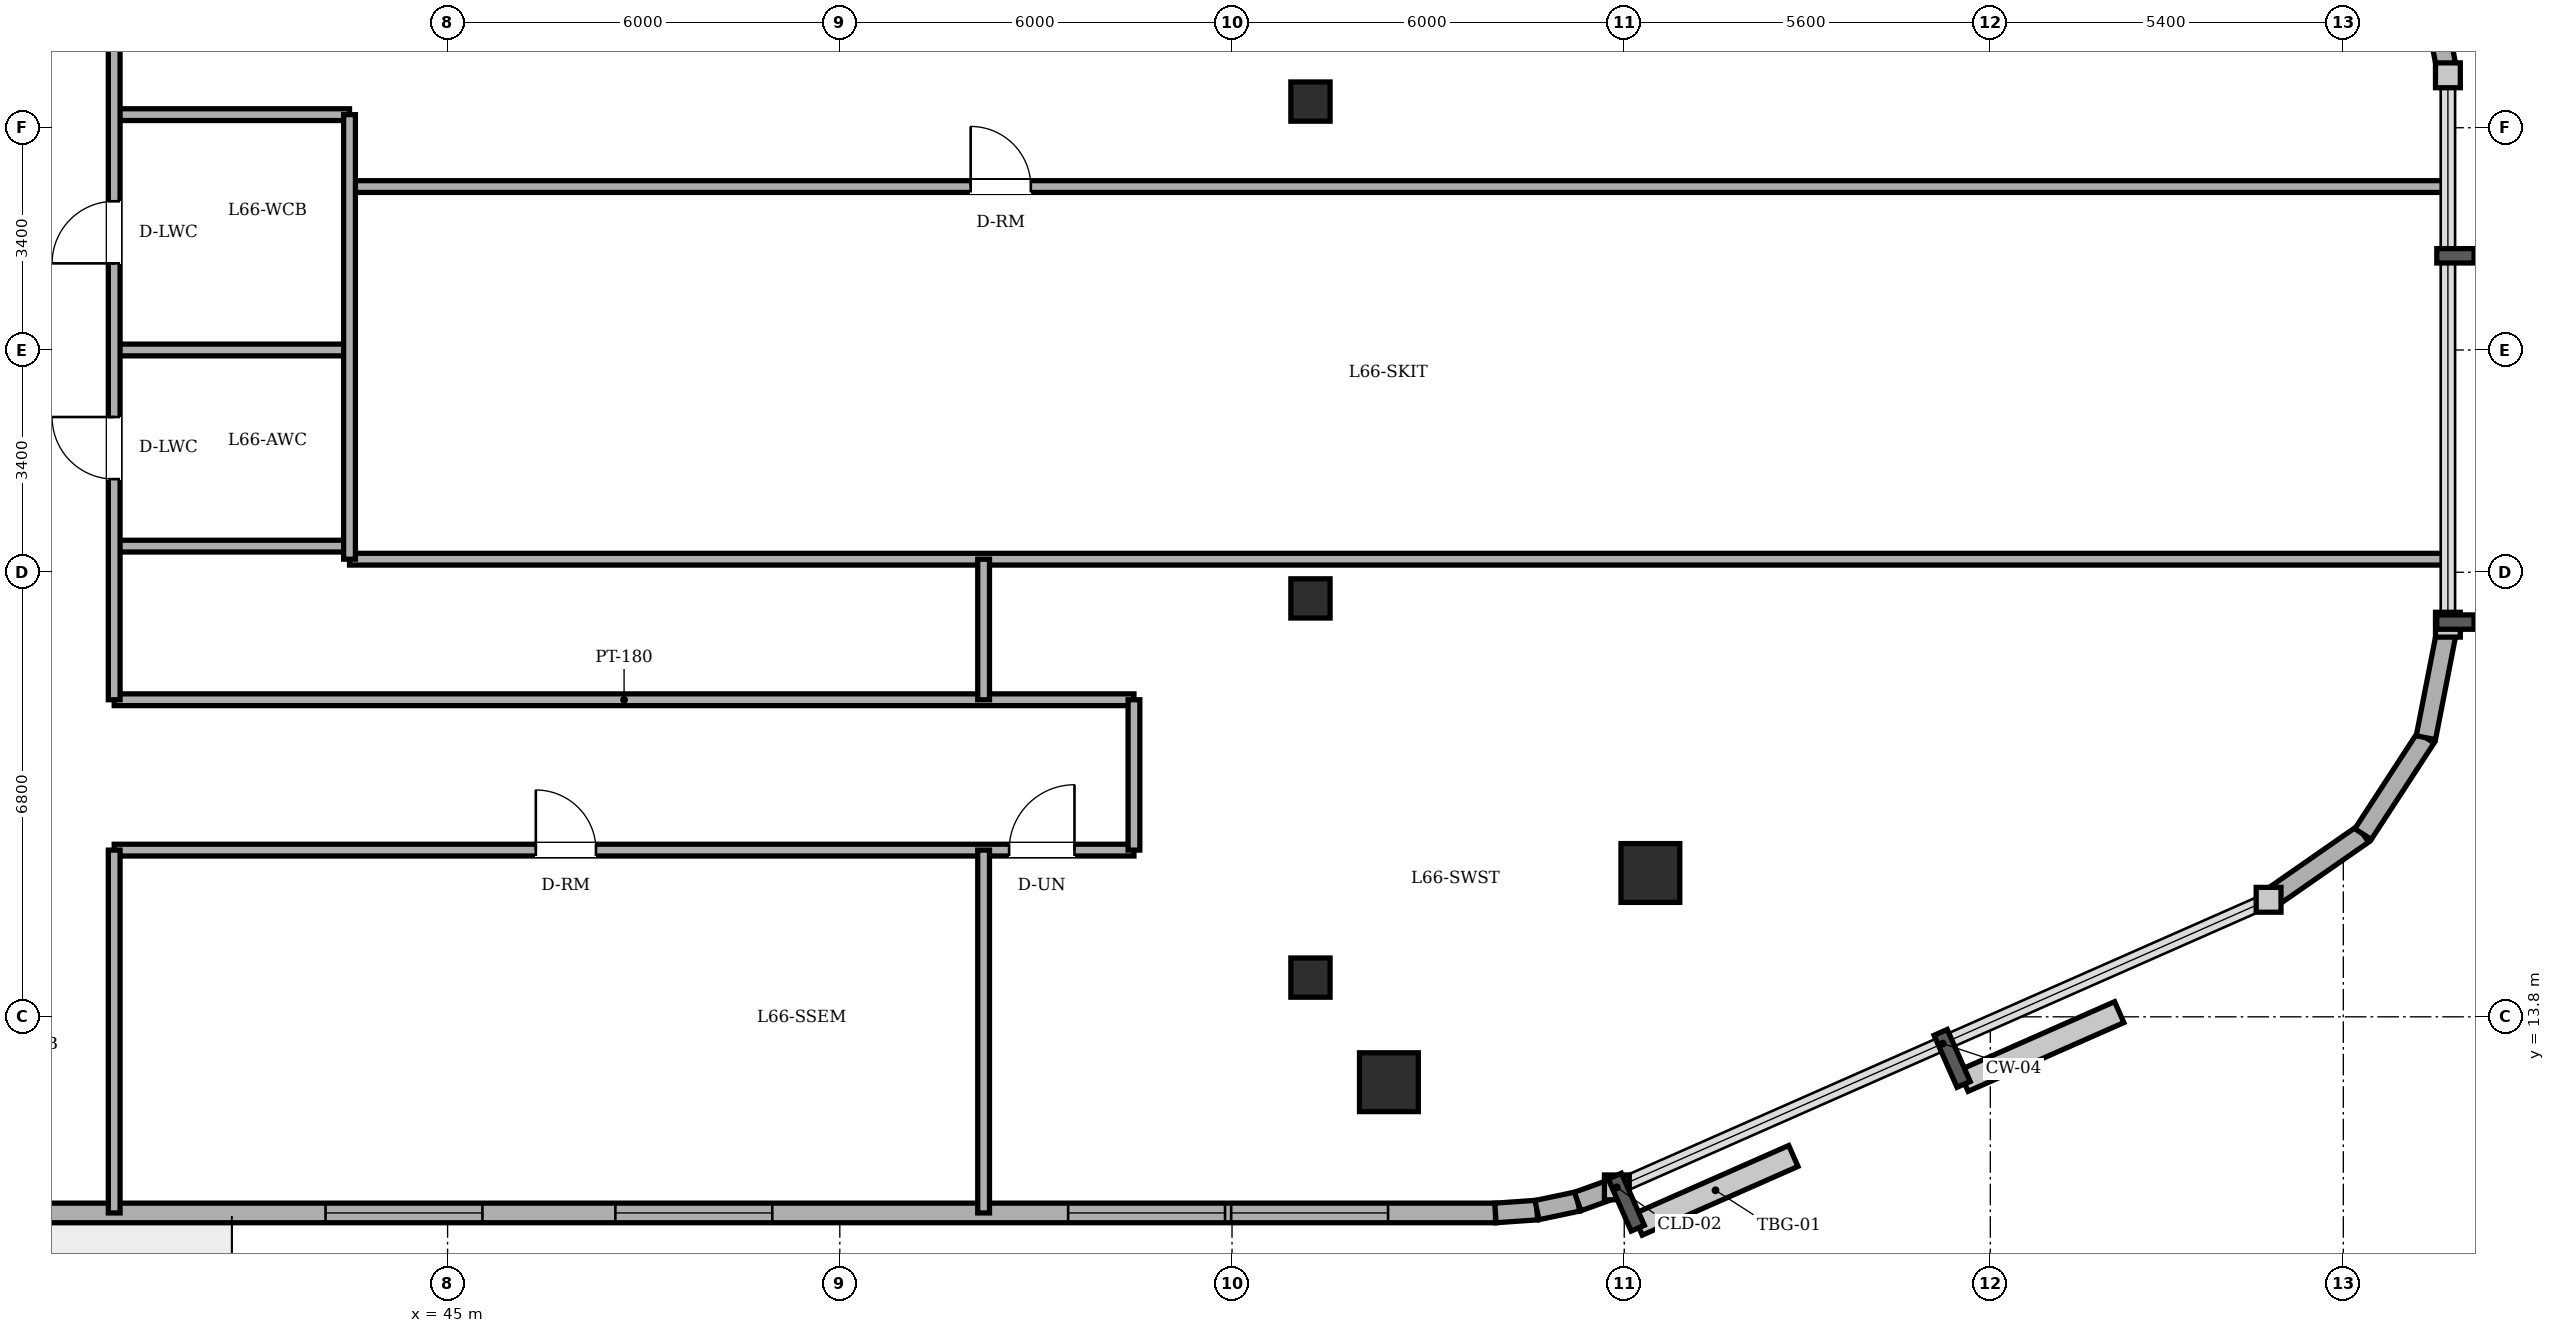
"""IFC4 building model, lengths in metres.
Left out: names, types, materials, properties, quantities, classifications, styles, units other than length and angle.
Written with IfcOpenShell. Run it as: python <this file> out.ifc"""

import sys

from ifc_helpers import new_model, si_unit, direction, frame, frame_2d, origin, origin_2d, place, context, subcontext, project, spatial, rectangle, circle, extrude, element, fill, save


model = new_model("IFC4")
c1 = context("Model", 3, precision=1e-05, world=origin(), true_north=direction((0.0, 1.0)))
c2 = subcontext(c1, "Body", "Model", "MODEL_VIEW")
j1 = project(units=[si_unit("LENGTHUNIT", "METRE"), si_unit("PLANEANGLEUNIT", "RADIAN")], contexts=[c1])
p1 = place(None, origin())
s1 = spatial("IfcSite", under=j1, at=p1, CompositionType="ELEMENT")
p2 = place(p1, origin())
s2 = spatial("IfcBuilding", under=s1, at=p2, CompositionType="ELEMENT")
p3 = place(p2, frame((0.0, 0.0, 253.7)))
s3 = spatial("IfcBuildingStorey", under=s2, at=p3, CompositionType="ELEMENT", Elevation=253.7)
for number, where, z_axis, x_axis in (
    (1, (59.4, 12.8, 0.0), (0.0, 0.0, 1.0), (1.0, 0.0, 0.0)),
    (2, (63.4, 16.0, 0.0), (0.0, 0.0, 1.0), (1.0, 0.0, 0.0)),
):
    element("IfcColumn", number, at=place(p3, frame(where, z_axis=z_axis, x_axis=x_axis)), inside=s3, PredefinedType="COLUMN", context=c2, shape_type="SweptSolid", body=[
        extrude(circle(Radius=0.45, at=origin_2d()), origin(), (0.0, 0.0, 1.0), 5.1),
    ])
for number, where, z_axis, x_axis in (
    (3, (58.2, 14.4, 0.0), (0.0, 0.0, 1.0), (1.0, 0.0, 0.0)),
    (4, (58.2, 20.2, 0.0), (0.0, 0.0, 1.0), (1.0, 0.0, 0.0)),
    (5, (58.2, 27.8, 0.0), (0.0, 0.0, 1.0), (1.0, 0.0, 0.0)),
):
    element("IfcColumn", number, at=place(p3, frame(where, z_axis=z_axis, x_axis=x_axis)), inside=s3, PredefinedType="COLUMN", context=c2, shape_type="SweptSolid", body=[
        extrude(rectangle(XDim=0.6, YDim=0.6, at=origin_2d()), origin(), (0.0, 0.0, 1.0), 5.1),
    ])
p4 = place(p3, frame((24.0, 10.8, 0.0), z_axis=(0.0, 0.0, 1.0), x_axis=(1.0, 0.0, 0.0)))
e6 = element("IfcWall", 6, at=p4, inside=s3, PredefinedType="SOLIDWALL", context=c2, shape_type="SweptSolid", body=[
    extrude(rectangle(XDim=37.03, YDim=0.3, at=frame_2d((18.515, 0.0))), origin(), (0.0, 0.0, 1.0), 4.9),
])
p5 = place(p4, frame((11.225, 0.0, 0.0)))
e7 = element("IfcOpeningElement", 7, at=p5, cuts=e6, PredefinedType="OPENING", context=c2, shape_type="SweptSolid", body=[
    extrude(rectangle(XDim=0.95, YDim=2.2, at=frame_2d((0.475, 1.1))), frame((0.0, 0.16, 0.0), z_axis=(0.0, -1.0, 0.0), x_axis=(1.0, 0.0, 0.0)), (0.0, 0.0, 1.0), 0.32),
])
p6 = place(p4, frame((4.333, 0.0, 0.85)))
e8 = element("IfcOpeningElement", 8, at=p6, cuts=e6, PredefinedType="OPENING", context=c2, shape_type="SweptSolid", body=[
    extrude(rectangle(XDim=2.4, YDim=2.1, at=frame_2d((1.2, 1.05))), frame((0.0, 0.16, 0.0), z_axis=(0.0, -1.0, 0.0), x_axis=(1.0, 0.0, 0.0)), (0.0, 0.0, 1.0), 0.32),
])
p7 = place(p4, frame((19.133, 0.0, 0.85)))
e9 = element("IfcOpeningElement", 9, at=p7, cuts=e6, PredefinedType="OPENING", context=c2, shape_type="SweptSolid", body=[
    extrude(rectangle(XDim=2.4, YDim=2.1, at=frame_2d((1.2, 1.05))), frame((0.0, 0.16, 0.0), z_axis=(0.0, -1.0, 0.0), x_axis=(1.0, 0.0, 0.0)), (0.0, 0.0, 1.0), 0.32),
])
p8 = place(p4, frame((23.567, 0.0, 0.85)))
e10 = element("IfcOpeningElement", 10, at=p8, cuts=e6, PredefinedType="OPENING", context=c2, shape_type="SweptSolid", body=[
    extrude(rectangle(XDim=2.4, YDim=2.1, at=frame_2d((1.2, 1.05))), frame((0.0, 0.16, 0.0), z_axis=(0.0, -1.0, 0.0), x_axis=(1.0, 0.0, 0.0)), (0.0, 0.0, 1.0), 0.32),
])
p9 = place(p4, frame((30.493, 0.0, 0.85)))
e11 = element("IfcOpeningElement", 11, at=p9, cuts=e6, PredefinedType="OPENING", context=c2, shape_type="SweptSolid", body=[
    extrude(rectangle(XDim=2.4, YDim=2.1, at=frame_2d((1.2, 1.05))), frame((0.0, 0.16, 0.0), z_axis=(0.0, -1.0, 0.0), x_axis=(1.0, 0.0, 0.0)), (0.0, 0.0, 1.0), 0.32),
])
p10 = place(p4, frame((32.987, 0.0, 0.85)))
e12 = element("IfcOpeningElement", 12, at=p10, cuts=e6, PredefinedType="OPENING", context=c2, shape_type="SweptSolid", body=[
    extrude(rectangle(XDim=2.4, YDim=2.1, at=frame_2d((1.2, 1.05))), frame((0.0, 0.16, 0.0), z_axis=(0.0, -1.0, 0.0), x_axis=(1.0, 0.0, 0.0)), (0.0, 0.0, 1.0), 0.32),
])
p11 = place(p3, frame((61.03, 10.8, 0.0), z_axis=(0.0, 0.0, 1.0), x_axis=(0.997613959688, 0.069039028352, 0.0)))
e13 = element("IfcWall", 13, at=p11, inside=s3, PredefinedType="SOLIDWALL", context=c2, shape_type="SweptSolid", body=[
    extrude(rectangle(XDim=0.636, YDim=0.3, at=frame_2d((0.318, 0.0))), origin(), (0.0, 0.0, 1.0), 4.9),
])
p12 = place(p3, frame((61.665, 10.844, 0.0), z_axis=(0.0, 0.0, 1.0), x_axis=(0.97857012251, 0.205913854149, 0.0)))
e14 = element("IfcWall", 14, at=p12, inside=s3, PredefinedType="SOLIDWALL", context=c2, shape_type="SweptSolid", body=[
    extrude(rectangle(XDim=0.637, YDim=0.3, at=frame_2d((0.318, 0.0))), origin(), (0.0, 0.0, 1.0), 4.9),
])
p13 = place(p3, frame((62.288, 10.975, 0.0), z_axis=(0.0, 0.0, 1.0), x_axis=(0.94077491148, 0.339031806665, 0.0)))
e15 = element("IfcWall", 15, at=p13, inside=s3, PredefinedType="SOLIDWALL", context=c2, shape_type="SweptSolid", body=[
    extrude(rectangle(XDim=0.636, YDim=0.3, at=frame_2d((0.318, 0.0))), origin(), (0.0, 0.0, 1.0), 4.9),
])
p14 = place(p3, frame((72.857, 15.59, 0.0), z_axis=(0.0, 0.0, 1.0), x_axis=(0.821006966142, 0.570918174124, 0.0)))
e16 = element("IfcWall", 16, at=p14, inside=s3, PredefinedType="SOLIDWALL", context=c2, shape_type="SweptSolid", body=[
    extrude(rectangle(XDim=1.76, YDim=0.3, at=frame_2d((0.88, 0.0))), origin(), (0.0, 0.0, 1.0), 4.9),
])
for number, where, z_axis, x_axis in (
    (17, (74.302, 16.595, 0.0), (0.0, 0.0, 1.0), (0.546, 0.838, 0.0)),
    (18, (75.263, 18.07, 0.0), (0.0, 0.0, 1.0), (0.192, 0.981, 0.0)),
    (19, (75.6, 28.202, 0.0), (0.0, 0.0, 1.0), (-0.192, 0.981, 0.0)),
):
    element("IfcWall", number, at=place(p3, frame(where, z_axis=z_axis, x_axis=x_axis)), inside=s3, PredefinedType="SOLIDWALL", context=c2, shape_type="SweptSolid", body=[
        extrude(rectangle(XDim=1.76, YDim=0.3, at=frame_2d((0.88, 0.0))), origin(), (0.0, 0.0, 1.0), 4.9),
    ])
p15 = place(p3, frame((39.9, 16.35, 0.0), z_axis=(0.0, 0.0, 1.0), x_axis=(1.0, 0.0, 0.0)))
e20 = element("IfcWall", 20, at=p15, inside=s3, PredefinedType="PARTITIONING", context=c2, shape_type="SweptSolid", body=[
    extrude(rectangle(XDim=15.6, YDim=0.18, at=frame_2d((7.8, 0.0))), origin(), (0.0, 0.0, 1.0), 4.522),
])
p16 = place(p15, frame((6.45, 0.0, 0.0)))
e21 = element("IfcOpeningElement", 21, at=p16, cuts=e20, PredefinedType="OPENING", context=c2, shape_type="SweptSolid", body=[
    extrude(rectangle(XDim=0.92, YDim=2.1, at=frame_2d((0.46, 1.05))), frame((0.0, 0.1, 0.0), z_axis=(0.0, -1.0, 0.0), x_axis=(1.0, 0.0, 0.0)), (0.0, 0.0, 1.0), 0.2),
])
p17 = place(p15, frame((13.69, 0.0, 0.0)))
e22 = element("IfcOpeningElement", 22, at=p17, cuts=e20, PredefinedType="OPENING", context=c2, shape_type="SweptSolid", body=[
    extrude(rectangle(XDim=1.0, YDim=2.15, at=frame_2d((0.5, 1.075))), frame((0.0, 0.1, 0.0), z_axis=(0.0, -1.0, 0.0), x_axis=(1.0, 0.0, 0.0)), (0.0, 0.0, 1.0), 0.2),
])
p18 = place(p3, frame((39.9, 18.65, 0.0), z_axis=(0.0, 0.0, 1.0), x_axis=(1.0, 0.0, 0.0)))
e23 = element("IfcWall", 23, at=p18, inside=s3, PredefinedType="PARTITIONING", context=c2, shape_type="SweptSolid", body=[
    extrude(rectangle(XDim=15.6, YDim=0.18, at=frame_2d((7.8, 0.0))), origin(), (0.0, 0.0, 1.0), 4.9),
])
p19 = place(p3, frame((43.5, 20.8, 0.0), z_axis=(0.0, 0.0, 1.0), x_axis=(1.0, 0.0, 0.0)))
e24 = element("IfcWall", 24, at=p19, inside=s3, PredefinedType="PARTITIONING", context=c2, shape_type="SweptSolid", body=[
    extrude(rectangle(XDim=32.1, YDim=0.18, at=frame_2d((16.05, 0.0))), origin(), (0.0, 0.0, 1.0), 4.9),
])
p20 = place(p3, frame((39.9, 21.0, 0.0), z_axis=(0.0, 0.0, 1.0), x_axis=(1.0, 0.0, 0.0)))
e25 = element("IfcWall", 25, at=p20, inside=s3, PredefinedType="PARTITIONING", context=c2, shape_type="SweptSolid", body=[
    extrude(rectangle(XDim=3.6, YDim=0.18, at=frame_2d((1.8, 0.0))), origin(), (0.0, 0.0, 1.0), 4.9),
])
p21 = place(p3, frame((39.9, 24.0, 0.0), z_axis=(0.0, 0.0, 1.0), x_axis=(1.0, 0.0, 0.0)))
e26 = element("IfcWall", 26, at=p21, inside=s3, PredefinedType="PARTITIONING", context=c2, shape_type="SweptSolid", body=[
    extrude(rectangle(XDim=3.6, YDim=0.18, at=frame_2d((1.8, 0.0))), origin(), (0.0, 0.0, 1.0), 4.522),
])
p22 = place(p3, frame((43.5, 26.5, 0.0), z_axis=(0.0, 0.0, 1.0), x_axis=(1.0, 0.0, 0.0)))
e27 = element("IfcWall", 27, at=p22, inside=s3, PredefinedType="PARTITIONING", context=c2, shape_type="SweptSolid", body=[
    extrude(rectangle(XDim=32.1, YDim=0.18, at=frame_2d((16.05, 0.0))), origin(), (0.0, 0.0, 1.0), 4.9),
])
p23 = place(p22, frame((9.502, 0.0, 0.0)))
e28 = element("IfcOpeningElement", 28, at=p23, cuts=e27, PredefinedType="OPENING", context=c2, shape_type="SweptSolid", body=[
    extrude(rectangle(XDim=0.92, YDim=2.1, at=frame_2d((0.46, 1.05))), frame((0.0, 0.1, 0.0), z_axis=(0.0, -1.0, 0.0), x_axis=(1.0, 0.0, 0.0)), (0.0, 0.0, 1.0), 0.2),
])
p24 = place(p3, frame((39.9, 27.6, 0.0), z_axis=(0.0, 0.0, 1.0), x_axis=(1.0, 0.0, 0.0)))
e29 = element("IfcWall", 29, at=p24, inside=s3, PredefinedType="PARTITIONING", context=c2, shape_type="SweptSolid", body=[
    extrude(rectangle(XDim=3.6, YDim=0.18, at=frame_2d((1.8, 0.0))), origin(), (0.0, 0.0, 1.0), 4.542),
])
p25 = place(p3, frame((39.9, 10.8, 0.0), z_axis=(0.0, 0.0, 1.0), x_axis=(0.0, 1.0, 0.0)))
e30 = element("IfcWall", 30, at=p25, inside=s3, PredefinedType="PARTITIONING", context=c2, shape_type="SweptSolid", body=[
    extrude(rectangle(XDim=5.55, YDim=0.18, at=frame_2d((2.775, 0.0))), origin(), (0.0, 0.0, 1.0), 4.9),
])
p26 = place(p3, frame((39.9, 18.65, 0.0), z_axis=(0.0, 0.0, 1.0), x_axis=(0.0, 1.0, 0.0)))
e31 = element("IfcWall", 31, at=p26, inside=s3, PredefinedType="PARTITIONING", context=c2, shape_type="SweptSolid", body=[
    extrude(rectangle(XDim=18.55, YDim=0.18, at=frame_2d((9.275, 0.0))), origin(), (0.0, 0.0, 1.0), 4.9),
])
p27 = place(p26, frame((3.375, 0.0, 0.0)))
e32 = element("IfcOpeningElement", 32, at=p27, cuts=e31, PredefinedType="OPENING", context=c2, shape_type="SweptSolid", body=[
    extrude(rectangle(XDim=0.95, YDim=2.15, at=frame_2d((0.475, 1.075))), frame((0.0, 0.1, 0.0), z_axis=(0.0, -1.0, 0.0), x_axis=(1.0, 0.0, 0.0)), (0.0, 0.0, 1.0), 0.2),
])
p28 = place(p26, frame((6.675, 0.0, 0.0)))
e33 = element("IfcOpeningElement", 33, at=p28, cuts=e31, PredefinedType="OPENING", context=c2, shape_type="SweptSolid", body=[
    extrude(rectangle(XDim=0.95, YDim=2.15, at=frame_2d((0.475, 1.075))), frame((0.0, 0.1, 0.0), z_axis=(0.0, -1.0, 0.0), x_axis=(1.0, 0.0, 0.0)), (0.0, 0.0, 1.0), 0.2),
])
p29 = place(p26, frame((12.79, 0.0, 0.0)))
e34 = element("IfcOpeningElement", 34, at=p29, cuts=e31, PredefinedType="OPENING", context=c2, shape_type="SweptSolid", body=[
    extrude(rectangle(XDim=0.92, YDim=2.1, at=frame_2d((0.46, 1.05))), frame((0.0, 0.1, 0.0), z_axis=(0.0, -1.0, 0.0), x_axis=(1.0, 0.0, 0.0)), (0.0, 0.0, 1.0), 0.2),
])
p30 = place(p3, frame((43.5, 20.8, 0.0), z_axis=(0.0, 0.0, 1.0), x_axis=(0.0, 1.0, 0.0)))
e35 = element("IfcWall", 35, at=p30, inside=s3, PredefinedType="PARTITIONING", context=c2, shape_type="SweptSolid", body=[
    extrude(rectangle(XDim=6.8, YDim=0.18, at=frame_2d((3.4, 0.0))), origin(), (0.0, 0.0, 1.0), 4.9),
])
p31 = place(p3, frame((53.2, 10.8, 0.0), z_axis=(0.0, 0.0, 1.0), x_axis=(0.0, 1.0, 0.0)))
e36 = element("IfcWall", 36, at=p31, inside=s3, PredefinedType="PARTITIONING", context=c2, shape_type="SweptSolid", body=[
    extrude(rectangle(XDim=5.55, YDim=0.18, at=frame_2d((2.775, 0.0))), origin(), (0.0, 0.0, 1.0), 4.9),
])
p32 = place(p3, frame((53.2, 18.65, 0.0), z_axis=(0.0, 0.0, 1.0), x_axis=(0.0, 1.0, 0.0)))
e37 = element("IfcWall", 37, at=p32, inside=s3, PredefinedType="PARTITIONING", context=c2, shape_type="SweptSolid", body=[
    extrude(rectangle(XDim=2.15, YDim=0.18, at=frame_2d((1.075, 0.0))), origin(), (0.0, 0.0, 1.0), 4.9),
])
p33 = place(p3, frame((55.5, 16.35, 0.0), z_axis=(0.0, 0.0, 1.0), x_axis=(0.0, 1.0, 0.0)))
e38 = element("IfcWall", 38, at=p33, inside=s3, PredefinedType="PARTITIONING", context=c2, shape_type="SweptSolid", body=[
    extrude(rectangle(XDim=2.3, YDim=0.18, at=frame_2d((1.15, 0.0))), origin(), (0.0, 0.0, 1.0), 4.9),
])
p34 = place(p7, origin())
e39 = element("IfcWindow", 39, at=p34, inside=s3, PartitioningType="TRIPLE_PANEL_VERTICAL", PredefinedType="WINDOW", context=c2, shape_type="SweptSolid", body=[
    extrude(rectangle(XDim=2.4, YDim=2.1, at=frame_2d((1.2, 1.05))), frame((0.0, 0.03, 0.0), z_axis=(0.0, -1.0, 0.0), x_axis=(1.0, 0.0, 0.0)), (0.0, 0.0, 1.0), 0.06),
])
fill(e9, e39)
p35 = place(p8, origin())
e40 = element("IfcWindow", 40, at=p35, inside=s3, PartitioningType="TRIPLE_PANEL_VERTICAL", PredefinedType="WINDOW", context=c2, shape_type="SweptSolid", body=[
    extrude(rectangle(XDim=2.4, YDim=2.1, at=frame_2d((1.2, 1.05))), frame((0.0, 0.03, 0.0), z_axis=(0.0, -1.0, 0.0), x_axis=(1.0, 0.0, 0.0)), (0.0, 0.0, 1.0), 0.06),
])
fill(e10, e40)
p36 = place(p9, origin())
e41 = element("IfcWindow", 41, at=p36, inside=s3, PartitioningType="TRIPLE_PANEL_VERTICAL", PredefinedType="WINDOW", context=c2, shape_type="SweptSolid", body=[
    extrude(rectangle(XDim=2.4, YDim=2.1, at=frame_2d((1.2, 1.05))), frame((0.0, 0.03, 0.0), z_axis=(0.0, -1.0, 0.0), x_axis=(1.0, 0.0, 0.0)), (0.0, 0.0, 1.0), 0.06),
])
fill(e11, e41)
p37 = place(p10, origin())
e42 = element("IfcWindow", 42, at=p37, inside=s3, PartitioningType="TRIPLE_PANEL_VERTICAL", PredefinedType="WINDOW", context=c2, shape_type="SweptSolid", body=[
    extrude(rectangle(XDim=2.4, YDim=2.1, at=frame_2d((1.2, 1.05))), frame((0.0, 0.03, 0.0), z_axis=(0.0, -1.0, 0.0), x_axis=(1.0, 0.0, 0.0)), (0.0, 0.0, 1.0), 0.06),
])
fill(e12, e42)
p38 = place(p27, origin())
e43 = element("IfcDoor", 43, at=p38, inside=s3, OperationType="SINGLE_SWING_RIGHT", PredefinedType="DOOR", context=c2, shape_type="SweptSolid", body=[
    extrude(rectangle(XDim=0.95, YDim=2.15, at=frame_2d((0.475, 1.075))), frame((0.0, 0.025, 0.0), z_axis=(0.0, -1.0, 0.0), x_axis=(1.0, 0.0, 0.0)), (0.0, 0.0, 1.0), 0.05),
])
fill(e32, e43)
p39 = place(p28, origin())
e44 = element("IfcDoor", 44, at=p39, inside=s3, OperationType="SINGLE_SWING_LEFT", PredefinedType="DOOR", context=c2, shape_type="SweptSolid", body=[
    extrude(rectangle(XDim=0.95, YDim=2.15, at=frame_2d((0.475, 1.075))), frame((0.0, 0.025, 0.0), z_axis=(0.0, -1.0, 0.0), x_axis=(1.0, 0.0, 0.0)), (0.0, 0.0, 1.0), 0.05),
])
fill(e33, e44)
p40 = place(p16, origin())
e45 = element("IfcDoor", 45, at=p40, inside=s3, OperationType="SINGLE_SWING_LEFT", PredefinedType="DOOR", context=c2, shape_type="SweptSolid", body=[
    extrude(rectangle(XDim=0.92, YDim=2.1, at=frame_2d((0.46, 1.05))), frame((0.0, 0.025, 0.0), z_axis=(0.0, -1.0, 0.0), x_axis=(1.0, 0.0, 0.0)), (0.0, 0.0, 1.0), 0.05),
])
fill(e21, e45)
p41 = place(p17, origin())
e46 = element("IfcDoor", 46, at=p41, inside=s3, OperationType="SINGLE_SWING_RIGHT", PredefinedType="DOOR", context=c2, shape_type="SweptSolid", body=[
    extrude(rectangle(XDim=1.0, YDim=2.15, at=frame_2d((0.5, 1.075))), frame((0.0, 0.025, 0.0), z_axis=(0.0, -1.0, 0.0), x_axis=(1.0, 0.0, 0.0)), (0.0, 0.0, 1.0), 0.05),
])
fill(e22, e46)
p42 = place(p23, origin())
e47 = element("IfcDoor", 47, at=p42, inside=s3, OperationType="SINGLE_SWING_LEFT", PredefinedType="DOOR", context=c2, shape_type="SweptSolid", body=[
    extrude(rectangle(XDim=0.92, YDim=2.1, at=frame_2d((0.46, 1.05))), frame((0.0, 0.025, 0.0), z_axis=(0.0, -1.0, 0.0), x_axis=(1.0, 0.0, 0.0)), (0.0, 0.0, 1.0), 0.05),
])
fill(e28, e47)
save(model, sys.argv[1])
